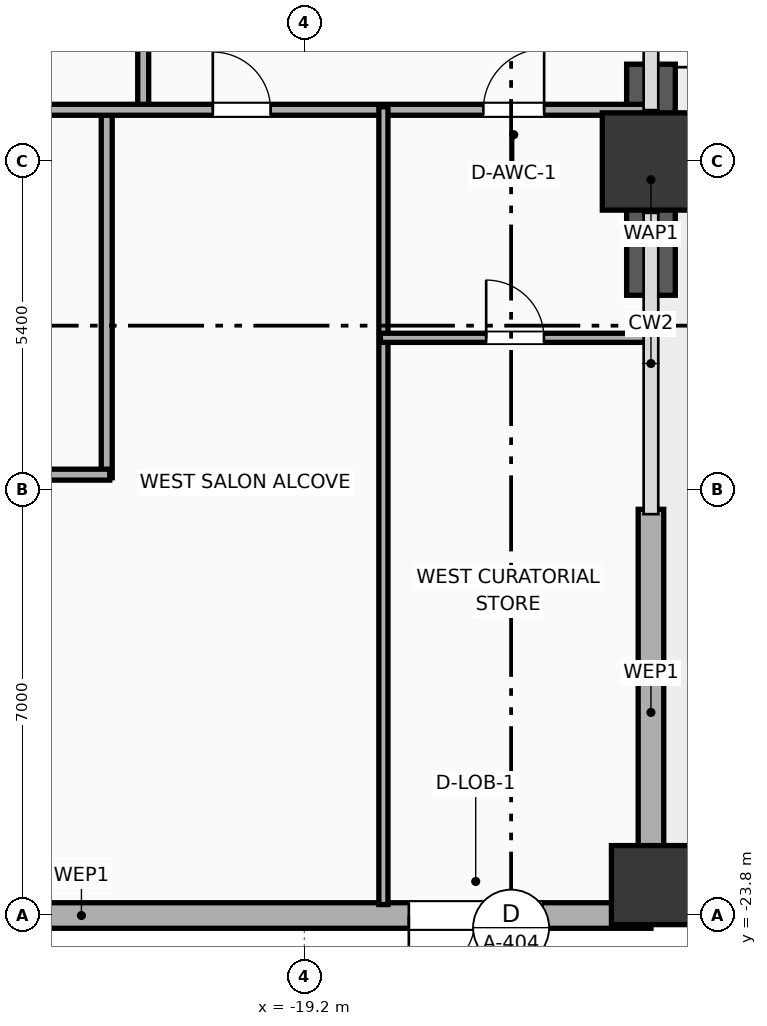
"""IFC4 building model, lengths in metres.
Left out: names, types, materials, properties, quantities, classifications, styles, units other than length and angle.
Written with IfcOpenShell. Run it as: python <this file> out.ifc"""

import sys

from ifc_helpers import new_model, si_unit, direction, frame, frame_2d, origin, origin_2d, place, context, subcontext, project, spatial, rectangle, extrude, element, fill, save


model = new_model("IFC4")
c1 = context("Model", 3, precision=1e-05, world=origin(), true_north=direction((0.0, 1.0)))
c2 = subcontext(c1, "Body", "Model", "MODEL_VIEW")
j1 = project(units=[si_unit("LENGTHUNIT", "METRE"), si_unit("PLANEANGLEUNIT", "RADIAN")], contexts=[c1])
p1 = place(None, origin())
s1 = spatial("IfcSite", under=j1, at=p1, CompositionType="ELEMENT")
p2 = place(p1, origin())
s2 = spatial("IfcBuilding", under=s1, at=p2, CompositionType="ELEMENT")
p3 = place(p2, origin())
s3 = spatial("IfcBuildingStorey", under=s2, at=p3, CompositionType="ELEMENT", Elevation=0.0)
p4 = place(p3, frame((-13.5, -23.3, 0.0), z_axis=(0.0, 0.0, 1.0), x_axis=(1.0, 0.0, 0.0)))
e1 = element("IfcColumn", 1, at=p4, inside=s3, PredefinedType="COLUMN", context=c2, shape_type="SweptSolid", body=[
    extrude(rectangle(XDim=1.3, YDim=1.3, at=origin_2d()), origin(), (0.0, 0.0, 1.0), 5.2),
])
p5 = place(p3, frame((-13.5, -11.4, 0.0), z_axis=(0.0, 0.0, 1.0), x_axis=(1.0, 0.0, 0.0)))
e2 = element("IfcColumn", 2, at=p5, inside=s3, PredefinedType="COLUMN", context=c2, shape_type="SweptSolid", body=[
    extrude(rectangle(XDim=1.6, YDim=1.6, at=origin_2d()), origin(), (0.0, 0.0, 1.0), 5.2),
])
p6 = place(p3, frame((-13.5, -13.6, 0.0), z_axis=(0.0, 0.0, 1.0), x_axis=(0.0, 1.0, 0.0)))
e3 = element("IfcWall", 3, at=p6, inside=s3, PredefinedType="SOLIDWALL", context=c2, shape_type="SweptSolid", body=[
    extrude(rectangle(XDim=3.8, YDim=0.8, at=frame_2d((1.9, 0.0))), origin(), (0.0, 0.0, 1.0), 4.92),
])
p7 = place(p3, frame((-13.5, -23.8, 0.0), z_axis=(0.0, 0.0, 1.0), x_axis=(-1.0, 0.0, 0.0)))
e4 = element("IfcWall", 4, at=p7, inside=s3, PredefinedType="ELEMENTEDWALL", context=c2, shape_type="SweptSolid", body=[
    extrude(rectangle(XDim=24.9, YDim=0.42, at=frame_2d((12.45, 0.0))), origin(), (0.0, 0.0, 1.0), 4.92),
])
p8 = place(p7, frame((14.75, 0.0, 0.0)))
e5 = element("IfcOpeningElement", 5, at=p8, cuts=e4, PredefinedType="OPENING", context=c2, shape_type="SweptSolid", body=[
    extrude(rectangle(XDim=1.1, YDim=2.05, at=frame_2d((0.55, 1.025))), frame((0.0, 0.22, 0.0), z_axis=(0.0, -1.0, 0.0), x_axis=(1.0, 0.0, 0.0)), (0.0, 0.0, 1.0), 0.44),
])
p9 = place(p7, frame((1.782, 0.0, 0.0)))
e6 = element("IfcOpeningElement", 6, at=p9, cuts=e4, PredefinedType="OPENING", context=c2, shape_type="SweptSolid", body=[
    extrude(rectangle(XDim=2.2, YDim=2.4, at=frame_2d((1.1, 1.2))), frame((0.0, 0.22, 0.0), z_axis=(0.0, -1.0, 0.0), x_axis=(1.0, 0.0, 0.0)), (0.0, 0.0, 1.0), 0.44),
])
p10 = place(p7, frame((17.824, 0.0, 0.0)))
e7 = element("IfcOpeningElement", 7, at=p10, cuts=e4, PredefinedType="OPENING", context=c2, shape_type="SweptSolid", body=[
    extrude(rectangle(XDim=2.2, YDim=2.4, at=frame_2d((1.1, 1.2))), frame((0.0, 0.22, 0.0), z_axis=(0.0, -1.0, 0.0), x_axis=(1.0, 0.0, 0.0)), (0.0, 0.0, 1.0), 0.44),
])
p11 = place(p3, frame((-13.5, -23.8, 0.0), z_axis=(0.0, 0.0, 1.0), x_axis=(0.0, 1.0, 0.0)))
e8 = element("IfcWall", 8, at=p11, inside=s3, PredefinedType="ELEMENTEDWALL", context=c2, shape_type="SweptSolid", body=[
    extrude(rectangle(XDim=6.68, YDim=0.42, at=frame_2d((3.34, 0.0))), origin(), (0.0, 0.0, 1.0), 4.21),
])
p12 = place(p3, frame((-22.45, -16.6, 0.0), z_axis=(0.0, 0.0, 1.0), x_axis=(0.0, 1.0, 0.0)))
e9 = element("IfcWall", 9, at=p12, inside=s3, PredefinedType="PARTITIONING", context=c2, shape_type="SweptSolid", body=[
    extrude(rectangle(XDim=6.1, YDim=0.18, at=frame_2d((3.05, 0.0))), origin(), (0.0, 0.0, 1.0), 4.92),
])
p13 = place(p3, frame((-27.45, -16.55, 0.0), z_axis=(0.0, 0.0, 1.0), x_axis=(1.0, 0.0, 0.0)))
e10 = element("IfcWall", 10, at=p13, inside=s3, PredefinedType="PARTITIONING", context=c2, shape_type="SweptSolid", body=[
    extrude(rectangle(XDim=5.05, YDim=0.18, at=frame_2d((2.525, 0.0))), origin(), (0.0, 0.0, 1.0), 4.92),
])
p14 = place(p3, frame((-21.85, -10.5, 0.0), z_axis=(0.0, 0.0, 1.0), x_axis=(0.0, 1.0, 0.0)))
e11 = element("IfcWall", 11, at=p14, inside=s3, PredefinedType="PARTITIONING", context=c2, shape_type="SweptSolid", body=[
    extrude(rectangle(XDim=34.12, YDim=0.18, at=frame_2d((17.06, 0.0))), origin(), (0.0, 0.0, 1.0), 4.92),
])
p15 = place(p14, frame((13.531, 0.0, 0.0)))
e12 = element("IfcOpeningElement", 12, at=p15, cuts=e11, PredefinedType="OPENING", context=c2, shape_type="SweptSolid", body=[
    extrude(rectangle(XDim=1.6, YDim=2.05, at=frame_2d((0.8, 1.025))), frame((0.0, 0.1, 0.0), z_axis=(0.0, -1.0, 0.0), x_axis=(1.0, 0.0, 0.0)), (0.0, 0.0, 1.0), 0.2),
])
p16 = place(p3, frame((-27.5, -10.55, 0.0), z_axis=(0.0, 0.0, 1.0), x_axis=(1.0, 0.0, 0.0)))
e13 = element("IfcWall", 13, at=p16, inside=s3, PredefinedType="PARTITIONING", context=c2, shape_type="SweptSolid", body=[
    extrude(rectangle(XDim=13.98, YDim=0.18, at=frame_2d((6.99, 0.0))), origin(), (0.0, 0.0, 1.0), 4.92),
])
p17 = place(p16, frame((2.701, 0.0, 0.0)))
e14 = element("IfcOpeningElement", 14, at=p17, cuts=e13, PredefinedType="OPENING", context=c2, shape_type="SweptSolid", body=[
    extrude(rectangle(XDim=0.95, YDim=2.05, at=frame_2d((0.475, 1.025))), frame((0.0, 0.1, 0.0), z_axis=(0.0, -1.0, 0.0), x_axis=(1.0, 0.0, 0.0)), (0.0, 0.0, 1.0), 0.2),
])
p18 = place(p16, frame((6.795, 0.0, 0.0)))
e15 = element("IfcOpeningElement", 15, at=p18, cuts=e13, PredefinedType="OPENING", context=c2, shape_type="SweptSolid", body=[
    extrude(rectangle(XDim=0.95, YDim=2.05, at=frame_2d((0.475, 1.025))), frame((0.0, 0.1, 0.0), z_axis=(0.0, -1.0, 0.0), x_axis=(1.0, 0.0, 0.0)), (0.0, 0.0, 1.0), 0.2),
])
p19 = place(p16, frame((11.243, 0.0, 0.0)))
e16 = element("IfcOpeningElement", 16, at=p19, cuts=e13, PredefinedType="OPENING", context=c2, shape_type="SweptSolid", body=[
    extrude(rectangle(XDim=1.0, YDim=2.05, at=frame_2d((0.5, 1.025))), frame((0.0, 0.1, 0.0), z_axis=(0.0, -1.0, 0.0), x_axis=(1.0, 0.0, 0.0)), (0.0, 0.0, 1.0), 0.2),
])
p20 = place(p3, frame((-17.9, -23.62, 0.0), z_axis=(0.0, 0.0, 1.0), x_axis=(0.0, 1.0, 0.0)))
e17 = element("IfcWall", 17, at=p20, inside=s3, PredefinedType="PLUMBINGWALL", context=c2, shape_type="SweptSolid", body=[
    extrude(rectangle(XDim=13.12, YDim=0.15, at=frame_2d((6.56, 0.0))), origin(), (0.0, 0.0, 1.0), 4.92),
])
p21 = place(p3, frame((-17.95, -14.3, 0.0), z_axis=(0.0, 0.0, 1.0), x_axis=(1.0, 0.0, 0.0)))
e18 = element("IfcWall", 18, at=p21, inside=s3, PredefinedType="PLUMBINGWALL", context=c2, shape_type="SweptSolid", body=[
    extrude(rectangle(XDim=4.43, YDim=0.15, at=frame_2d((2.215, 0.0))), origin(), (0.0, 0.0, 1.0), 4.92),
])
p22 = place(p21, frame((1.74, 0.0, 0.0)))
e19 = element("IfcOpeningElement", 19, at=p22, cuts=e18, PredefinedType="OPENING", context=c2, shape_type="SweptSolid", body=[
    extrude(rectangle(XDim=0.95, YDim=2.05, at=frame_2d((0.475, 1.025))), frame((0.0, 0.085, 0.0), z_axis=(0.0, -1.0, 0.0), x_axis=(1.0, 0.0, 0.0)), (0.0, 0.0, 1.0), 0.17),
])
p23 = place(p9, origin())
e20 = element("IfcDoor", 20, at=p23, inside=s3, OperationType="DOUBLE_DOOR_SINGLE_SWING", PredefinedType="DOOR", context=c2, shape_type="SweptSolid", body=[
    extrude(rectangle(XDim=2.2, YDim=2.4, at=frame_2d((1.1, 1.2))), frame((0.0, 0.025, 0.0), z_axis=(0.0, -1.0, 0.0), x_axis=(1.0, 0.0, 0.0)), (0.0, 0.0, 1.0), 0.05),
])
fill(e6, e20)
p24 = place(p18, origin())
e21 = element("IfcDoor", 21, at=p24, inside=s3, OperationType="SINGLE_SWING_LEFT", PredefinedType="DOOR", context=c2, shape_type="SweptSolid", body=[
    extrude(rectangle(XDim=0.95, YDim=2.05, at=frame_2d((0.475, 1.025))), frame((0.0, 0.025, 0.0), z_axis=(0.0, -1.0, 0.0), x_axis=(1.0, 0.0, 0.0)), (0.0, 0.0, 1.0), 0.05),
])
fill(e15, e21)
p25 = place(p19, origin())
e22 = element("IfcDoor", 22, at=p25, inside=s3, OperationType="SINGLE_SWING_RIGHT", PredefinedType="DOOR", context=c2, shape_type="SweptSolid", body=[
    extrude(rectangle(XDim=1.0, YDim=2.05, at=frame_2d((0.5, 1.025))), frame((0.0, 0.025, 0.0), z_axis=(0.0, -1.0, 0.0), x_axis=(1.0, 0.0, 0.0)), (0.0, 0.0, 1.0), 0.05),
])
fill(e16, e22)
p26 = place(p22, origin())
e23 = element("IfcDoor", 23, at=p26, inside=s3, OperationType="SINGLE_SWING_LEFT", PredefinedType="DOOR", context=c2, shape_type="SweptSolid", body=[
    extrude(rectangle(XDim=0.95, YDim=2.05, at=frame_2d((0.475, 1.025))), frame((0.0, 0.025, 0.0), z_axis=(0.0, -1.0, 0.0), x_axis=(1.0, 0.0, 0.0)), (0.0, 0.0, 1.0), 0.05),
])
fill(e19, e23)
save(model, sys.argv[1])
